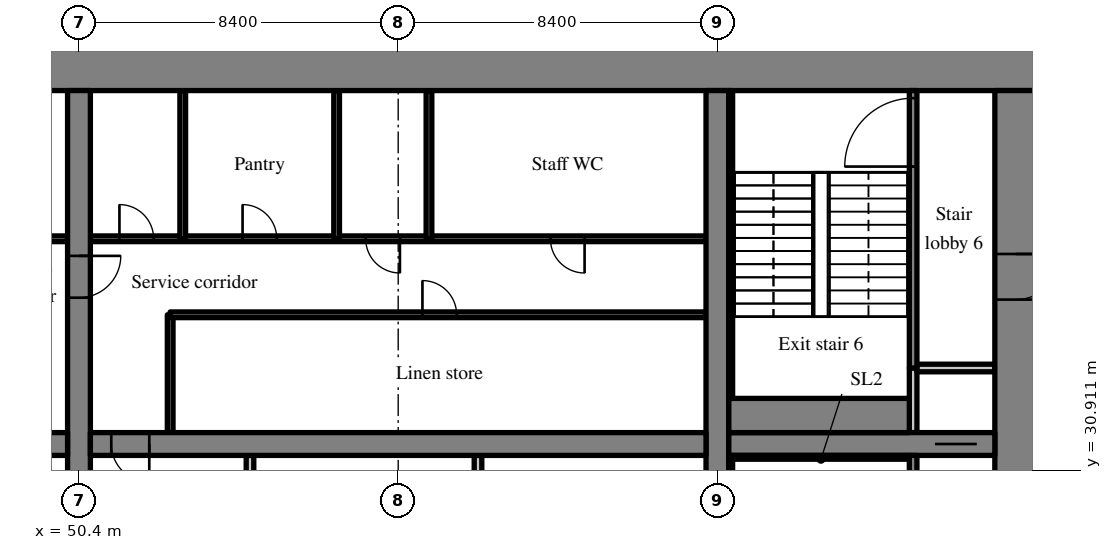
"""IFC4 building model, lengths in metres.
Left out: names, types, materials, properties, quantities, classifications, styles, units other than length and angle.
Written with IfcOpenShell. Run it as: python <this file> out.ifc"""

import sys

from ifc_helpers import new_model, si_unit, direction, frame, frame_2d, origin, place, context, subcontext, project, spatial, rectangle, extrude, source, transform, mapped, element, fill, save


model = new_model("IFC4")
c1 = context("Model", 3, precision=1e-05, world=origin(), true_north=direction((0.0, 1.0)))
c2 = subcontext(c1, "Body", "Model", "MODEL_VIEW")
j1 = project(units=[si_unit("LENGTHUNIT", "METRE"), si_unit("PLANEANGLEUNIT", "RADIAN")], contexts=[c1])
p1 = place(None, origin())
s1 = spatial("IfcSite", under=j1, at=p1, CompositionType="ELEMENT")
p2 = place(p1, origin())
s2 = spatial("IfcBuilding", under=s1, at=p2, CompositionType="ELEMENT")
p3 = place(p2, frame((0.0, 0.0, 23.0)))
s3 = spatial("IfcBuildingStorey", under=s2, at=p3, CompositionType="ELEMENT", Elevation=23.0)
m1 = source(origin(), c2, "Body", "SweptSolid", [
    extrude(rectangle(XDim=50.4, YDim=1.1, at=frame_2d((25.2, 0.0))), origin(), (0.0, 0.0, 1.0), 4.52),
])
p4 = place(p3, frame((25.2, 41.45, 0.0), z_axis=(0.0, 0.0, 1.0), x_axis=(1.0, 0.0, 0.0)))
e1 = element("IfcWall", 1, at=p4, inside=s3, PredefinedType="SHEAR", context=c2, shape_type="MappedRepresentation", body=[
    mapped(m1, transform((0.0, 0.0, 0.0), scale=1.0)),
])
m2 = source(origin(), c2, "Body", "SweptSolid", [
    extrude(rectangle(XDim=17.8, YDim=1.1, at=frame_2d((8.9, 0.0))), origin(), (0.0, 0.0, 1.0), 4.52),
])
p5 = place(p3, frame((75.05, 23.1, 0.0), z_axis=(0.0, 0.0, 1.0), x_axis=(0.0, 1.0, 0.0)))
e2 = element("IfcWall", 2, at=p5, inside=s3, PredefinedType="SHEAR", context=c2, shape_type="MappedRepresentation", body=[
    mapped(m2, transform((0.0, 0.0, 0.0), scale=1.0)),
])
m3 = source(origin(), c2, "Body", "SweptSolid", [
    extrude(rectangle(XDim=1.2, YDim=2.1, at=frame_2d((0.6, 1.05))), frame((0.0, 0.56, 0.0), z_axis=(0.0, -1.0, 0.0), x_axis=(1.0, 0.0, 0.0)), (0.0, 0.0, 1.0), 1.12),
])
p6 = place(p5, frame((12.3, 0.0, 0.0)))
e3 = element("IfcOpeningElement", 3, at=p6, cuts=e2, PredefinedType="OPENING", context=c2, shape_type="MappedRepresentation", body=[
    mapped(m3, transform((0.0, 0.0, 0.0), scale=1.0)),
])
m4 = source(origin(), c2, "Body", "SweptSolid", [
    extrude(rectangle(XDim=17.8, YDim=0.6, at=frame_2d((8.9, 0.0))), origin(), (0.0, 0.0, 1.0), 4.52),
])
p7 = place(p3, frame((50.4, 23.1, 0.0), z_axis=(0.0, 0.0, 1.0), x_axis=(0.0, 1.0, 0.0)))
e4 = element("IfcWall", 4, at=p7, inside=s3, PredefinedType="SHEAR", context=c2, shape_type="MappedRepresentation", body=[
    mapped(m4, transform((0.0, 0.0, 0.0), scale=1.0)),
])
m5 = source(origin(), c2, "Body", "SweptSolid", [
    extrude(rectangle(XDim=1.1, YDim=2.1, at=frame_2d((0.55, 1.05))), frame((0.0, 0.31, 0.0), z_axis=(0.0, -1.0, 0.0), x_axis=(1.0, 0.0, 0.0)), (0.0, 0.0, 1.0), 0.62),
])
p8 = place(p7, frame((12.35, 0.0, 0.0)))
e5 = element("IfcOpeningElement", 5, at=p8, cuts=e4, PredefinedType="OPENING", context=c2, shape_type="MappedRepresentation", body=[
    mapped(m5, transform((0.0, 0.0, 0.0), scale=1.0)),
])
p9 = place(p3, frame((67.2, 23.1, 0.0), z_axis=(0.0, 0.0, 1.0), x_axis=(0.0, 1.0, 0.0)))
e6 = element("IfcWall", 6, at=p9, inside=s3, PredefinedType="SHEAR", context=c2, shape_type="MappedRepresentation", body=[
    mapped(m4, transform((0.0, 0.0, 0.0), scale=1.0)),
])
m6 = source(origin(), c2, "Body", "SweptSolid", [
    extrude(rectangle(XDim=16.2, YDim=0.6, at=frame_2d((8.1, 0.0))), origin(), (0.0, 0.0, 1.0), 4.52),
])
p10 = place(p3, frame((33.9, 31.6, 0.0), z_axis=(0.0, 0.0, 1.0), x_axis=(1.0, 0.0, 0.0)))
e7 = element("IfcWall", 7, at=p10, inside=s3, PredefinedType="SHEAR", context=c2, shape_type="MappedRepresentation", body=[
    mapped(m6, transform((0.0, 0.0, 0.0), scale=1.0)),
])
m7 = source(origin(), c2, "Body", "SweptSolid", [
    extrude(rectangle(XDim=1.0, YDim=2.1, at=frame_2d((0.5, 1.05))), frame((0.0, 0.31, 0.0), z_axis=(0.0, -1.0, 0.0), x_axis=(1.0, 0.0, 0.0)), (0.0, 0.0, 1.0), 0.62),
])
p11 = place(p10, frame((14.65, 0.0, 0.0)))
e8 = element("IfcOpeningElement", 8, at=p11, cuts=e7, PredefinedType="OPENING", context=c2, shape_type="MappedRepresentation", body=[
    mapped(m7, transform((0.0, 0.0, 0.0), scale=1.0)),
])
m8 = source(origin(), c2, "Body", "SweptSolid", [
    extrude(rectangle(XDim=16.2, YDim=0.6, at=frame_2d((8.1, 0.0))), origin(), (0.0, 0.0, 1.0), 4.52),
])
p12 = place(p3, frame((50.7, 31.6, 0.0), z_axis=(0.0, 0.0, 1.0), x_axis=(1.0, 0.0, 0.0)))
e9 = element("IfcWall", 9, at=p12, inside=s3, PredefinedType="SHEAR", context=c2, shape_type="MappedRepresentation", body=[
    mapped(m8, transform((0.0, 0.0, 0.0), scale=1.0)),
])
p13 = place(p12, frame((0.55, 0.0, 0.0)))
e10 = element("IfcOpeningElement", 10, at=p13, cuts=e9, PredefinedType="OPENING", context=c2, shape_type="MappedRepresentation", body=[
    mapped(m7, transform((0.0, 0.0, 0.0), scale=1.0)),
])
m9 = source(origin(), c2, "Body", "SweptSolid", [
    extrude(rectangle(XDim=7.0, YDim=0.6, at=frame_2d((3.5, 0.0))), origin(), (0.0, 0.0, 1.0), 4.52),
])
p14 = place(p3, frame((67.5, 31.6, 0.0), z_axis=(0.0, 0.0, 1.0), x_axis=(1.0, 0.0, 0.0)))
e11 = element("IfcWall", 11, at=p14, inside=s3, PredefinedType="SHEAR", context=c2, shape_type="MappedRepresentation", body=[
    mapped(m9, transform((0.0, 0.0, 0.0), scale=1.0)),
])
p15 = place(p14, frame((5.425, 0.0, 0.0)))
e12 = element("IfcOpeningElement", 12, at=p15, cuts=e11, PredefinedType="OPENING", context=c2, shape_type="MappedRepresentation", body=[
    mapped(m5, transform((0.0, 0.0, 0.0), scale=1.0)),
])
m10 = source(origin(), c2, "Body", "SweptSolid", [
    extrude(rectangle(XDim=16.2, YDim=0.15, at=frame_2d((8.1, 0.0))), origin(), (0.0, 0.0, 1.0), 4.52),
])
p16 = place(p3, frame((33.9, 37.0, 0.0), z_axis=(0.0, 0.0, 1.0), x_axis=(1.0, 0.0, 0.0)))
e13 = element("IfcWall", 13, at=p16, inside=s3, PredefinedType="PARTITIONING", context=c2, shape_type="MappedRepresentation", body=[
    mapped(m10, transform((0.0, 0.0, 0.0), scale=1.0)),
])
m11 = source(origin(), c2, "Body", "SweptSolid", [
    extrude(rectangle(XDim=0.9, YDim=2.1, at=frame_2d((0.45, 1.05))), frame((0.0, 0.085, 0.0), z_axis=(0.0, -1.0, 0.0), x_axis=(1.0, 0.0, 0.0)), (0.0, 0.0, 1.0), 0.17),
])
p17 = place(p16, frame((1.575, 0.0, 0.0)))
e14 = element("IfcOpeningElement", 14, at=p17, cuts=e13, PredefinedType="OPENING", context=c2, shape_type="MappedRepresentation", body=[
    mapped(m11, transform((0.0, 0.0, 0.0), scale=1.0)),
])
p18 = place(p16, frame((7.245, 0.0, 0.0)))
e15 = element("IfcOpeningElement", 15, at=p18, cuts=e13, PredefinedType="OPENING", context=c2, shape_type="MappedRepresentation", body=[
    mapped(m11, transform((0.0, 0.0, 0.0), scale=1.0)),
])
p19 = place(p16, frame((12.105, 0.0, 0.0)))
e16 = element("IfcOpeningElement", 16, at=p19, cuts=e13, PredefinedType="OPENING", context=c2, shape_type="MappedRepresentation", body=[
    mapped(m11, transform((0.0, 0.0, 0.0), scale=1.0)),
])
p20 = place(p16, frame((14.535, 0.0, 0.0)))
e17 = element("IfcOpeningElement", 17, at=p20, cuts=e13, PredefinedType="OPENING", context=c2, shape_type="MappedRepresentation", body=[
    mapped(m11, transform((0.0, 0.0, 0.0), scale=1.0)),
])
m12 = source(origin(), c2, "Body", "SweptSolid", [
    extrude(rectangle(XDim=8.2, YDim=0.2, at=frame_2d((4.1, 0.0))), origin(), (0.0, 0.0, 1.0), 4.52),
])
for number, where, z_axis, x_axis in (
    (18, (54.9, 23.1, 0.0), (0.0, 0.0, 1.0), (0.0, 1.0, 0.0)),
    (19, (60.9, 23.1, 0.0), (0.0, 0.0, 1.0), (0.0, 1.0, 0.0)),
):
    element("IfcWall", number, at=place(p3, frame(where, z_axis=z_axis, x_axis=x_axis)), inside=s3, PredefinedType="PARTITIONING", context=c2, shape_type="MappedRepresentation", body=[
        mapped(m12, transform((0.0, 0.0, 0.0), scale=1.0)),
    ])
m13 = source(origin(), c2, "Body", "SweptSolid", [
    extrude(rectangle(XDim=3.1, YDim=0.15, at=frame_2d((1.55, 0.0))), origin(), (0.0, 0.0, 1.0), 4.52),
])
p21 = place(p3, frame((52.8, 31.9, 0.0), z_axis=(0.0, 0.0, 1.0), x_axis=(0.0, 1.0, 0.0)))
e20 = element("IfcWall", 20, at=p21, inside=s3, PredefinedType="PARTITIONING", context=c2, shape_type="MappedRepresentation", body=[
    mapped(m13, transform((0.0, 0.0, 0.0), scale=1.0)),
])
m14 = source(origin(), c2, "Body", "SweptSolid", [
    extrude(rectangle(XDim=14.1, YDim=0.15, at=frame_2d((7.05, 0.0))), origin(), (0.0, 0.0, 1.0), 4.52),
])
p22 = place(p3, frame((66.9, 35.0, 0.0), z_axis=(0.0, 0.0, 1.0), x_axis=(-1.0, 0.0, 0.0)))
e21 = element("IfcWall", 21, at=p22, inside=s3, PredefinedType="PARTITIONING", context=c2, shape_type="MappedRepresentation", body=[
    mapped(m14, transform((0.0, 0.0, 0.0), scale=1.0)),
])
p23 = place(p22, frame((6.562, 0.0, 0.0)))
e22 = element("IfcOpeningElement", 22, at=p23, cuts=e21, PredefinedType="OPENING", context=c2, shape_type="MappedRepresentation", body=[
    mapped(m11, transform((0.0, 0.0, 0.0), scale=1.0)),
])
m15 = source(origin(), c2, "Body", "SweptSolid", [
    extrude(rectangle(XDim=16.2, YDim=0.15, at=frame_2d((8.1, 0.0))), origin(), (0.0, 0.0, 1.0), 4.52),
])
p24 = place(p3, frame((66.9, 37.0, 0.0), z_axis=(0.0, 0.0, 1.0), x_axis=(-1.0, 0.0, 0.0)))
e23 = element("IfcWall", 23, at=p24, inside=s3, PredefinedType="PARTITIONING", context=c2, shape_type="MappedRepresentation", body=[
    mapped(m15, transform((0.0, 0.0, 0.0), scale=1.0)),
])
p25 = place(p24, frame((3.195, 0.0, 0.0)))
e24 = element("IfcOpeningElement", 24, at=p25, cuts=e23, PredefinedType="OPENING", context=c2, shape_type="MappedRepresentation", body=[
    mapped(m11, transform((0.0, 0.0, 0.0), scale=1.0)),
])
p26 = place(p24, frame((8.055, 0.0, 0.0)))
e25 = element("IfcOpeningElement", 25, at=p26, cuts=e23, PredefinedType="OPENING", context=c2, shape_type="MappedRepresentation", body=[
    mapped(m11, transform((0.0, 0.0, 0.0), scale=1.0)),
])
p27 = place(p24, frame((11.295, 0.0, 0.0)))
e26 = element("IfcOpeningElement", 26, at=p27, cuts=e23, PredefinedType="OPENING", context=c2, shape_type="MappedRepresentation", body=[
    mapped(m11, transform((0.0, 0.0, 0.0), scale=1.0)),
])
p28 = place(p24, frame((14.535, 0.0, 0.0)))
e27 = element("IfcOpeningElement", 27, at=p28, cuts=e23, PredefinedType="OPENING", context=c2, shape_type="MappedRepresentation", body=[
    mapped(m11, transform((0.0, 0.0, 0.0), scale=1.0)),
])
m16 = source(origin(), c2, "Body", "SweptSolid", [
    extrude(rectangle(XDim=3.9, YDim=0.15, at=frame_2d((1.95, 0.0))), origin(), (0.0, 0.0, 1.0), 4.52),
])
for number, where, z_axis, x_axis in (
    (28, (59.61, 37.0, 0.0), (0.0, 0.0, 1.0), (0.0, 1.0, 0.0)),
    (29, (57.18, 37.0, 0.0), (0.0, 0.0, 1.0), (0.0, 1.0, 0.0)),
    (30, (53.13, 37.0, 0.0), (0.0, 0.0, 1.0), (0.0, 1.0, 0.0)),
):
    element("IfcWall", number, at=place(p3, frame(where, z_axis=z_axis, x_axis=x_axis)), inside=s3, PredefinedType="PARTITIONING", context=c2, shape_type="MappedRepresentation", body=[
        mapped(m16, transform((0.0, 0.0, 0.0), scale=1.0)),
    ])
m17 = source(origin(), c2, "Body", "SweptSolid", [
    extrude(rectangle(XDim=8.2, YDim=0.2, at=frame_2d((4.1, 0.0))), origin(), (0.0, 0.0, 1.0), 4.52),
])
p29 = place(p3, frame((72.35, 23.1, 0.0), z_axis=(0.0, 0.0, 1.0), x_axis=(0.0, 1.0, 0.0)))
e31 = element("IfcWall", 31, at=p29, inside=s3, PredefinedType="SOLIDWALL", context=c2, shape_type="MappedRepresentation", body=[
    mapped(m17, transform((0.0, 0.0, 0.0), scale=1.0)),
])
m18 = source(origin(), c2, "Body", "SweptSolid", [
    extrude(rectangle(XDim=1.2, YDim=2.1, at=frame_2d((0.6, 1.05))), frame((0.0, 0.11, 0.0), z_axis=(0.0, -1.0, 0.0), x_axis=(1.0, 0.0, 0.0)), (0.0, 0.0, 1.0), 0.22),
])
p30 = place(p29, frame((6.4, 0.0, 0.0)))
e32 = element("IfcOpeningElement", 32, at=p30, cuts=e31, PredefinedType="OPENING", context=c2, shape_type="MappedRepresentation", body=[
    mapped(m18, transform((0.0, 0.0, 0.0), scale=1.0)),
])
m19 = source(origin(), c2, "Body", "SweptSolid", [
    extrude(rectangle(XDim=1.7, YDim=0.2, at=frame_2d((0.85, 0.0))), origin(), (0.0, 0.0, 1.0), 4.52),
])
p31 = place(p3, frame((72.35, 31.9, 0.0), z_axis=(0.0, 0.0, 1.0), x_axis=(0.0, 1.0, 0.0)))
e33 = element("IfcWall", 33, at=p31, inside=s3, PredefinedType="SOLIDWALL", context=c2, shape_type="MappedRepresentation", body=[
    mapped(m19, transform((0.0, 0.0, 0.0), scale=1.0)),
])
m20 = source(origin(), c2, "Body", "SweptSolid", [
    extrude(rectangle(XDim=2.05, YDim=0.2, at=frame_2d((1.025, 0.0))), origin(), (0.0, 0.0, 1.0), 4.52),
])
p32 = place(p3, frame((72.45, 33.6, 0.0), z_axis=(0.0, 0.0, 1.0), x_axis=(1.0, 0.0, 0.0)))
e34 = element("IfcWall", 34, at=p32, inside=s3, PredefinedType="SOLIDWALL", context=c2, shape_type="MappedRepresentation", body=[
    mapped(m20, transform((0.0, 0.0, 0.0), scale=1.0)),
])
m21 = source(origin(), c2, "Body", "SweptSolid", [
    extrude(rectangle(XDim=7.3, YDim=0.2, at=frame_2d((3.65, 0.0))), origin(), (0.0, 0.0, 1.0), 4.52),
])
p33 = place(p3, frame((72.35, 33.6, 0.0), z_axis=(0.0, 0.0, 1.0), x_axis=(0.0, 1.0, 0.0)))
e35 = element("IfcWall", 35, at=p33, inside=s3, PredefinedType="SOLIDWALL", context=c2, shape_type="MappedRepresentation", body=[
    mapped(m21, transform((0.0, 0.0, 0.0), scale=1.0)),
])
m22 = source(origin(), c2, "Body", "SweptSolid", [
    extrude(rectangle(XDim=1.8, YDim=2.1, at=frame_2d((0.9, 1.05))), frame((0.0, 0.11, 0.0), z_axis=(0.0, -1.0, 0.0), x_axis=(1.0, 0.0, 0.0)), (0.0, 0.0, 1.0), 0.22),
])
p34 = place(p33, frame((5.3, 0.0, 0.0)))
e36 = element("IfcOpeningElement", 36, at=p34, cuts=e35, PredefinedType="OPENING", context=c2, shape_type="MappedRepresentation", body=[
    mapped(m22, transform((0.0, 0.0, 0.0), scale=1.0)),
])
m23 = source(origin(), c2, "Body", "SweptSolid", [
    extrude(rectangle(XDim=4.75, YDim=0.1, at=frame_2d((2.375, 0.0))), origin(), (0.0, 0.0, 1.0), 4.52),
])
p35 = place(p3, frame((67.5, 31.25, 0.0), z_axis=(0.0, 0.0, 1.0), x_axis=(1.0, 0.0, 0.0)))
e37 = element("IfcWall", 37, at=p35, inside=s3, PredefinedType="SOLIDWALL", context=c2, shape_type="MappedRepresentation", body=[
    mapped(m23, transform((0.0, 0.0, 0.0), scale=1.0)),
])
m24 = source(origin(), c2, "Body", "SweptSolid", [
    extrude(rectangle(XDim=8.1, YDim=0.1, at=frame_2d((4.05, 0.0))), origin(), (0.0, 0.0, 1.0), 4.52),
])
p36 = place(p3, frame((67.55, 23.1, 0.0), z_axis=(0.0, 0.0, 1.0), x_axis=(0.0, 1.0, 0.0)))
e38 = element("IfcWall", 38, at=p36, inside=s3, PredefinedType="SOLIDWALL", context=c2, shape_type="MappedRepresentation", body=[
    mapped(m24, transform((0.0, 0.0, 0.0), scale=1.0)),
])
m25 = source(origin(), c2, "Body", "SweptSolid", [
    extrude(rectangle(XDim=4.75, YDim=0.9, at=frame_2d((2.375, 0.0))), origin(), (0.0, 0.0, 1.0), 4.52),
])
p37 = place(p3, frame((67.5, 32.35, 0.0), z_axis=(0.0, 0.0, 1.0), x_axis=(1.0, 0.0, 0.0)))
e39 = element("IfcWall", 39, at=p37, inside=s3, PredefinedType="SOLIDWALL", context=c2, shape_type="MappedRepresentation", body=[
    mapped(m25, transform((0.0, 0.0, 0.0), scale=1.0)),
])
p38 = place(p3, frame((67.55, 32.8, 0.0), z_axis=(0.0, 0.0, 1.0), x_axis=(0.0, 1.0, 0.0)))
e40 = element("IfcWall", 40, at=p38, inside=s3, PredefinedType="SOLIDWALL", context=c2, shape_type="MappedRepresentation", body=[
    mapped(m24, transform((0.0, 0.0, 0.0), scale=1.0)),
])
m26 = source(origin(), c2, "Body", "SweptSolid", [
    extrude(rectangle(XDim=1.0, YDim=2.1, at=frame_2d((0.5, 1.05))), frame((0.0, 0.025, 0.0), z_axis=(0.0, -1.0, 0.0), x_axis=(1.0, 0.0, 0.0)), (0.0, 0.0, 1.0), 0.05),
])
p39 = place(p13, origin())
e41 = element("IfcDoor", 41, at=p39, inside=s3, OperationType="SINGLE_SWING_RIGHT", PredefinedType="DOOR", context=c2, shape_type="MappedRepresentation", body=[
    mapped(m26, transform((0.0, 0.0, 0.0), scale=1.0)),
])
fill(e10, e41)
m27 = source(origin(), c2, "Body", "SweptSolid", [
    extrude(rectangle(XDim=0.9, YDim=2.1, at=frame_2d((0.45, 1.05))), frame((0.0, 0.025, 0.0), z_axis=(0.0, -1.0, 0.0), x_axis=(1.0, 0.0, 0.0)), (0.0, 0.0, 1.0), 0.05),
])
p40 = place(p23, origin())
e42 = element("IfcDoor", 42, at=p40, inside=s3, OperationType="SINGLE_SWING_RIGHT", PredefinedType="DOOR", context=c2, shape_type="MappedRepresentation", body=[
    mapped(m27, transform((0.0, 0.0, 0.0), scale=1.0)),
])
fill(e22, e42)
p41 = place(p25, origin())
e43 = element("IfcDoor", 43, at=p41, inside=s3, OperationType="SINGLE_SWING_LEFT", PredefinedType="DOOR", context=c2, shape_type="MappedRepresentation", body=[
    mapped(m27, transform((0.0, 0.0, 0.0), scale=1.0)),
])
fill(e24, e43)
p42 = place(p26, origin())
e44 = element("IfcDoor", 44, at=p42, inside=s3, OperationType="SINGLE_SWING_LEFT", PredefinedType="DOOR", context=c2, shape_type="MappedRepresentation", body=[
    mapped(m27, transform((0.0, 0.0, 0.0), scale=1.0)),
])
fill(e25, e44)
p43 = place(p27, origin())
e45 = element("IfcDoor", 45, at=p43, inside=s3, OperationType="SINGLE_SWING_RIGHT", PredefinedType="DOOR", context=c2, shape_type="MappedRepresentation", body=[
    mapped(m27, transform((0.0, 0.0, 0.0), scale=1.0)),
])
fill(e26, e45)
p44 = place(p28, origin())
e46 = element("IfcDoor", 46, at=p44, inside=s3, OperationType="SINGLE_SWING_RIGHT", PredefinedType="DOOR", context=c2, shape_type="MappedRepresentation", body=[
    mapped(m27, transform((0.0, 0.0, 0.0), scale=1.0)),
])
fill(e27, e46)
m28 = source(origin(), c2, "Body", "SweptSolid", [
    extrude(rectangle(XDim=1.1, YDim=2.1, at=frame_2d((0.55, 1.05))), frame((0.0, 0.025, 0.0), z_axis=(0.0, -1.0, 0.0), x_axis=(1.0, 0.0, 0.0)), (0.0, 0.0, 1.0), 0.05),
])
p45 = place(p15, origin())
e47 = element("IfcDoor", 47, at=p45, inside=s3, OperationType="SLIDING_TO_RIGHT", PredefinedType="DOOR", context=c2, shape_type="MappedRepresentation", body=[
    mapped(m28, transform((0.0, 0.0, 0.0), scale=1.0)),
])
fill(e12, e47)
m29 = source(origin(), c2, "Body", "SweptSolid", [
    extrude(rectangle(XDim=1.8, YDim=2.1, at=frame_2d((0.9, 1.05))), frame((0.0, 0.025, 0.0), z_axis=(0.0, -1.0, 0.0), x_axis=(1.0, 0.0, 0.0)), (0.0, 0.0, 1.0), 0.05),
])
p46 = place(p34, origin())
e48 = element("IfcDoor", 48, at=p46, inside=s3, OperationType="SINGLE_SWING_LEFT", PredefinedType="DOOR", context=c2, shape_type="MappedRepresentation", body=[
    mapped(m29, transform((0.0, 0.0, 0.0), scale=1.0)),
])
fill(e36, e48)
m30 = source(origin(), c2, "Body", "SweptSolid", [
    extrude(rectangle(XDim=1.2, YDim=2.1, at=frame_2d((0.6, 1.05))), frame((0.0, 0.025, 0.0), z_axis=(0.0, -1.0, 0.0), x_axis=(1.0, 0.0, 0.0)), (0.0, 0.0, 1.0), 0.05),
])
p47 = place(p6, origin())
e49 = element("IfcDoor", 49, at=p47, inside=s3, OperationType="SINGLE_SWING_RIGHT", PredefinedType="DOOR", context=c2, shape_type="MappedRepresentation", body=[
    mapped(m30, transform((0.0, 0.0, 0.0), scale=1.0)),
])
fill(e3, e49)
p48 = place(p8, origin())
e50 = element("IfcDoor", 50, at=p48, inside=s3, OperationType="SINGLE_SWING_RIGHT", PredefinedType="DOOR", context=c2, shape_type="MappedRepresentation", body=[
    mapped(m28, transform((0.0, 0.0, 0.0), scale=1.0)),
])
fill(e5, e50)
save(model, sys.argv[1])
